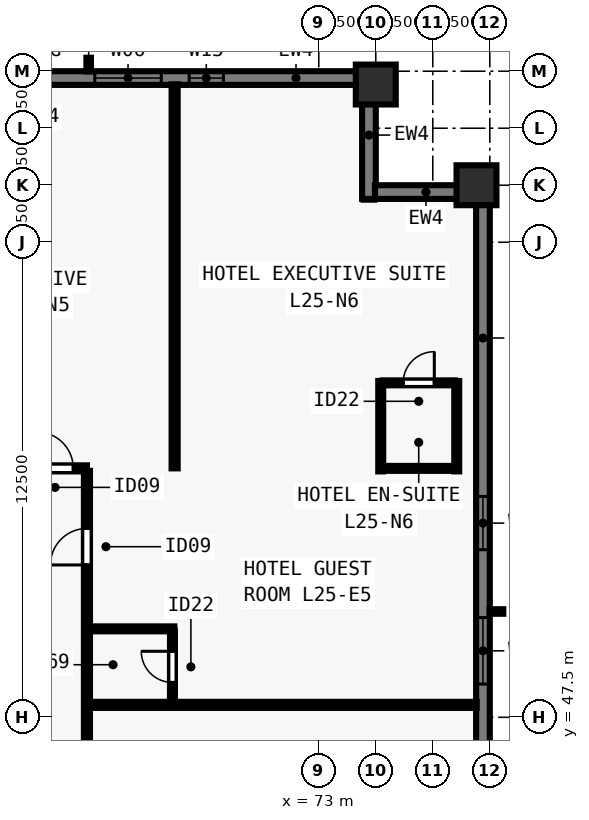
"""IFC4 building model, lengths in metres.
Left out: names, types, materials, properties, quantities, classifications, styles, units other than length and angle.
Written with IfcOpenShell. Run it as: python <this file> out.ifc"""

import sys

from ifc_helpers import new_model, si_unit, direction, frame, frame_2d, origin, origin_2d, place, context, subcontext, project, spatial, rectangle, extrude, element, fill, save


model = new_model("IFC4")
c1 = context("Model", 3, precision=1e-05, world=origin(), true_north=direction((0.0, 1.0)))
c2 = subcontext(c1, "Body", "Model", "MODEL_VIEW")
j1 = project(units=[si_unit("LENGTHUNIT", "METRE"), si_unit("PLANEANGLEUNIT", "RADIAN")], contexts=[c1])
p1 = place(None, origin())
s1 = spatial("IfcSite", under=j1, at=p1, CompositionType="ELEMENT")
p2 = place(p1, origin())
s2 = spatial("IfcBuilding", under=s1, at=p2, CompositionType="ELEMENT")
p3 = place(p2, frame((0.0, 0.0, 93.5)))
s3 = spatial("IfcBuildingStorey", under=s2, at=p3, CompositionType="ELEMENT", Elevation=93.5)
for number, where, z_axis, x_axis in (
    (1, (77.15, 61.5, 0.0), (0.0, 0.0, 1.0), (0.0, 1.0, 0.0)),
    (2, (74.5, 64.15, 0.0), (0.0, 0.0, 1.0), (1.0, 0.0, 0.0)),
):
    element("IfcColumn", number, at=place(p3, frame(where, z_axis=z_axis, x_axis=x_axis)), inside=s3, PredefinedType="COLUMN", context=c2, shape_type="SweptSolid", body=[
        extrude(rectangle(XDim=1.05, YDim=1.05, at=origin_2d()), origin(), (0.0, 0.0, 1.0), 3.5),
    ])
p4 = place(p3, frame((64.4, 64.32, 0.0), z_axis=(0.0, 0.0, 1.0), x_axis=(1.0, 0.0, 0.0)))
e3 = element("IfcWall", 3, at=p4, inside=s3, PredefinedType="SOLIDWALL", context=c2, shape_type="SweptSolid", body=[
    extrude(rectangle(XDim=9.762, YDim=0.36, at=frame_2d((4.881, 0.0))), origin(), (0.0, 0.0, 1.0), 3.24),
])
p5 = place(p4, frame((2.706, 0.0, 0.8)))
e4 = element("IfcOpeningElement", 4, at=p5, cuts=e3, PredefinedType="OPENING", context=c2, shape_type="SweptSolid", body=[
    extrude(rectangle(XDim=1.75, YDim=1.504, at=frame_2d((0.875, 0.752))), frame((0.0, 0.19, 0.0), z_axis=(0.0, -1.0, 0.0), x_axis=(1.0, 0.0, 0.0)), (0.0, 0.0, 1.0), 0.38),
])
p6 = place(p4, frame((5.19, 0.0, 0.8)))
e5 = element("IfcOpeningElement", 5, at=p6, cuts=e3, PredefinedType="OPENING", context=c2, shape_type="SweptSolid", body=[
    extrude(rectangle(XDim=0.9, YDim=1.504, at=frame_2d((0.45, 0.752))), frame((0.0, 0.19, 0.0), z_axis=(0.0, -1.0, 0.0), x_axis=(1.0, 0.0, 0.0)), (0.0, 0.0, 1.0), 0.38),
])
p7 = place(p3, frame((74.32, 64.5, 0.0), z_axis=(0.0, 0.0, 1.0), x_axis=(0.0, -1.0, 0.0)))
e6 = element("IfcWall", 6, at=p7, inside=s3, PredefinedType="SOLIDWALL", context=c2, shape_type="SweptSolid", body=[
    extrude(rectangle(XDim=3.36, YDim=0.36, at=frame_2d((1.68, 0.0))), origin(), (0.0, 0.0, 1.0), 3.24),
])
p8 = place(p3, frame((74.478, 61.32, 0.0), z_axis=(0.0, 0.0, 1.0), x_axis=(1.0, 0.0, 0.0)))
e7 = element("IfcWall", 7, at=p8, inside=s3, PredefinedType="SOLIDWALL", context=c2, shape_type="SweptSolid", body=[
    extrude(rectangle(XDim=2.684, YDim=0.36, at=frame_2d((1.342, 0.0))), origin(), (0.0, 0.0, 1.0), 3.24),
])
p9 = place(p3, frame((77.32, 61.5, 0.0), z_axis=(0.0, 0.0, 1.0), x_axis=(0.0, -1.0, 0.0)))
e8 = element("IfcWall", 8, at=p9, inside=s3, PredefinedType="SOLIDWALL", context=c2, shape_type="SweptSolid", body=[
    extrude(rectangle(XDim=44.662, YDim=0.36, at=frame_2d((22.331, 0.0))), origin(), (0.0, 0.0, 1.0), 3.24),
])
p10 = place(p9, frame((8.19, 0.0, 0.8)))
e9 = element("IfcOpeningElement", 9, at=p10, cuts=e8, PredefinedType="OPENING", context=c2, shape_type="SweptSolid", body=[
    extrude(rectangle(XDim=1.4, YDim=1.504, at=frame_2d((0.7, 0.752))), frame((0.0, 0.19, 0.0), z_axis=(0.0, -1.0, 0.0), x_axis=(1.0, 0.0, 0.0)), (0.0, 0.0, 1.0), 0.38),
])
p11 = place(p9, frame((11.375, 0.0, 0.8)))
e10 = element("IfcOpeningElement", 10, at=p11, cuts=e8, PredefinedType="OPENING", context=c2, shape_type="SweptSolid", body=[
    extrude(rectangle(XDim=1.75, YDim=1.504, at=frame_2d((0.875, 0.752))), frame((0.0, 0.19, 0.0), z_axis=(0.0, -1.0, 0.0), x_axis=(1.0, 0.0, 0.0)), (0.0, 0.0, 1.0), 0.38),
])
p12 = place(p9, frame((14.911, 0.0, 0.8)))
e11 = element("IfcOpeningElement", 11, at=p12, cuts=e8, PredefinedType="OPENING", context=c2, shape_type="SweptSolid", body=[
    extrude(rectangle(XDim=1.4, YDim=1.504, at=frame_2d((0.7, 0.752))), frame((0.0, 0.19, 0.0), z_axis=(0.0, -1.0, 0.0), x_axis=(1.0, 0.0, 0.0)), (0.0, 0.0, 1.0), 0.38),
])
p13 = place(p9, frame((21.631, 0.0, 0.8)))
e12 = element("IfcOpeningElement", 12, at=p13, cuts=e8, PredefinedType="OPENING", context=c2, shape_type="SweptSolid", body=[
    extrude(rectangle(XDim=1.4, YDim=1.504, at=frame_2d((0.7, 0.752))), frame((0.0, 0.19, 0.0), z_axis=(0.0, -1.0, 0.0), x_axis=(1.0, 0.0, 0.0)), (0.0, 0.0, 1.0), 0.38),
])
p14 = place(p9, frame((23.566, 0.0, 0.8)))
e13 = element("IfcOpeningElement", 13, at=p14, cuts=e8, PredefinedType="OPENING", context=c2, shape_type="SweptSolid", body=[
    extrude(rectangle(XDim=1.75, YDim=1.504, at=frame_2d((0.875, 0.752))), frame((0.0, 0.19, 0.0), z_axis=(0.0, -1.0, 0.0), x_axis=(1.0, 0.0, 0.0)), (0.0, 0.0, 1.0), 0.38),
])
p15 = place(p9, frame((28.351, 0.0, 0.8)))
e14 = element("IfcOpeningElement", 14, at=p15, cuts=e8, PredefinedType="OPENING", context=c2, shape_type="SweptSolid", body=[
    extrude(rectangle(XDim=1.4, YDim=1.504, at=frame_2d((0.7, 0.752))), frame((0.0, 0.19, 0.0), z_axis=(0.0, -1.0, 0.0), x_axis=(1.0, 0.0, 0.0)), (0.0, 0.0, 1.0), 0.38),
])
p16 = place(p9, frame((31.987, 0.0, 0.8)))
e15 = element("IfcOpeningElement", 15, at=p16, cuts=e8, PredefinedType="OPENING", context=c2, shape_type="SweptSolid", body=[
    extrude(rectangle(XDim=1.75, YDim=1.504, at=frame_2d((0.875, 0.752))), frame((0.0, 0.19, 0.0), z_axis=(0.0, -1.0, 0.0), x_axis=(1.0, 0.0, 0.0)), (0.0, 0.0, 1.0), 0.38),
])
p17 = place(p9, frame((35.072, 0.0, 0.8)))
e16 = element("IfcOpeningElement", 16, at=p17, cuts=e8, PredefinedType="OPENING", context=c2, shape_type="SweptSolid", body=[
    extrude(rectangle(XDim=1.4, YDim=1.504, at=frame_2d((0.7, 0.752))), frame((0.0, 0.19, 0.0), z_axis=(0.0, -1.0, 0.0), x_axis=(1.0, 0.0, 0.0)), (0.0, 0.0, 1.0), 0.38),
])
p18 = place(p9, frame((38.257, 0.0, 0.8)))
e17 = element("IfcOpeningElement", 17, at=p18, cuts=e8, PredefinedType="OPENING", context=c2, shape_type="SweptSolid", body=[
    extrude(rectangle(XDim=1.75, YDim=1.504, at=frame_2d((0.875, 0.752))), frame((0.0, 0.19, 0.0), z_axis=(0.0, -1.0, 0.0), x_axis=(1.0, 0.0, 0.0)), (0.0, 0.0, 1.0), 0.38),
])
p19 = place(p3, frame((37.1, 54.05, 0.0), z_axis=(0.0, 0.0, 1.0), x_axis=(1.0, 0.0, 0.0)))
e18 = element("IfcWall", 18, at=p19, inside=s3, PredefinedType="PARTITIONING", context=c2, shape_type="SweptSolid", body=[
    extrude(rectangle(XDim=29.8, YDim=0.16, at=frame_2d((14.9, 0.0))), origin(), (0.0, 0.0, 1.0), 3.24),
])
p20 = place(p19, frame((0.91, 0.0, 0.0)))
e19 = element("IfcOpeningElement", 19, at=p20, cuts=e18, PredefinedType="OPENING", context=c2, shape_type="SweptSolid", body=[
    extrude(rectangle(XDim=0.96, YDim=2.15, at=frame_2d((0.48, 1.075))), frame((0.0, 0.09, 0.0), z_axis=(0.0, -1.0, 0.0), x_axis=(1.0, 0.0, 0.0)), (0.0, 0.0, 1.0), 0.18),
])
p21 = place(p19, frame((3.03, 0.0, 0.0)))
e20 = element("IfcOpeningElement", 20, at=p21, cuts=e18, PredefinedType="OPENING", context=c2, shape_type="SweptSolid", body=[
    extrude(rectangle(XDim=0.96, YDim=2.15, at=frame_2d((0.48, 1.075))), frame((0.0, 0.09, 0.0), z_axis=(0.0, -1.0, 0.0), x_axis=(1.0, 0.0, 0.0)), (0.0, 0.0, 1.0), 0.18),
])
p22 = place(p19, frame((11.39, 0.0, 0.0)))
e21 = element("IfcOpeningElement", 21, at=p22, cuts=e18, PredefinedType="OPENING", context=c2, shape_type="SweptSolid", body=[
    extrude(rectangle(XDim=0.96, YDim=2.15, at=frame_2d((0.48, 1.075))), frame((0.0, 0.09, 0.0), z_axis=(0.0, -1.0, 0.0), x_axis=(1.0, 0.0, 0.0)), (0.0, 0.0, 1.0), 0.18),
])
p23 = place(p19, frame((19.75, 0.0, 0.0)))
e22 = element("IfcOpeningElement", 22, at=p23, cuts=e18, PredefinedType="OPENING", context=c2, shape_type="SweptSolid", body=[
    extrude(rectangle(XDim=0.96, YDim=2.15, at=frame_2d((0.48, 1.075))), frame((0.0, 0.09, 0.0), z_axis=(0.0, -1.0, 0.0), x_axis=(1.0, 0.0, 0.0)), (0.0, 0.0, 1.0), 0.18),
])
p24 = place(p19, frame((26.931, 0.0, 0.0)))
e23 = element("IfcOpeningElement", 23, at=p24, cuts=e18, PredefinedType="OPENING", context=c2, shape_type="SweptSolid", body=[
    extrude(rectangle(XDim=0.96, YDim=2.15, at=frame_2d((0.48, 1.075))), frame((0.0, 0.09, 0.0), z_axis=(0.0, -1.0, 0.0), x_axis=(1.0, 0.0, 0.0)), (0.0, 0.0, 1.0), 0.18),
])
p25 = place(p19, frame((28.48, 0.0, 0.0)))
e24 = element("IfcOpeningElement", 24, at=p25, cuts=e18, PredefinedType="OPENING", context=c2, shape_type="SweptSolid", body=[
    extrude(rectangle(XDim=0.96, YDim=2.15, at=frame_2d((0.48, 1.075))), frame((0.0, 0.09, 0.0), z_axis=(0.0, -1.0, 0.0), x_axis=(1.0, 0.0, 0.0)), (0.0, 0.0, 1.0), 0.18),
])
p26 = place(p3, frame((66.9, 24.015, 0.0), z_axis=(0.0, 0.0, 1.0), x_axis=(0.0, 1.0, 0.0)))
e25 = element("IfcWall", 25, at=p26, inside=s3, PredefinedType="PARTITIONING", context=c2, shape_type="SweptSolid", body=[
    extrude(rectangle(XDim=29.97, YDim=0.16, at=frame_2d((14.985, 0.0))), origin(), (0.0, 0.0, 1.0), 3.24),
])
p27 = place(p26, frame((3.911, 0.0, 0.0)))
e26 = element("IfcOpeningElement", 26, at=p27, cuts=e25, PredefinedType="OPENING", context=c2, shape_type="SweptSolid", body=[
    extrude(rectangle(XDim=0.96, YDim=2.15, at=frame_2d((0.48, 1.075))), frame((0.0, 0.09, 0.0), z_axis=(0.0, -1.0, 0.0), x_axis=(1.0, 0.0, 0.0)), (0.0, 0.0, 1.0), 0.18),
])
p28 = place(p26, frame((9.544, 0.0, 0.0)))
e27 = element("IfcOpeningElement", 27, at=p28, cuts=e25, PredefinedType="OPENING", context=c2, shape_type="SweptSolid", body=[
    extrude(rectangle(XDim=0.96, YDim=2.15, at=frame_2d((0.48, 1.075))), frame((0.0, 0.09, 0.0), z_axis=(0.0, -1.0, 0.0), x_axis=(1.0, 0.0, 0.0)), (0.0, 0.0, 1.0), 0.18),
])
p29 = place(p26, frame((15.625, 0.0, 0.0)))
e28 = element("IfcOpeningElement", 28, at=p29, cuts=e25, PredefinedType="OPENING", context=c2, shape_type="SweptSolid", body=[
    extrude(rectangle(XDim=0.96, YDim=2.15, at=frame_2d((0.48, 1.075))), frame((0.0, 0.09, 0.0), z_axis=(0.0, -1.0, 0.0), x_axis=(1.0, 0.0, 0.0)), (0.0, 0.0, 1.0), 0.18),
])
p30 = place(p26, frame((21.584, 0.0, 0.0)))
e29 = element("IfcOpeningElement", 29, at=p30, cuts=e25, PredefinedType="OPENING", context=c2, shape_type="SweptSolid", body=[
    extrude(rectangle(XDim=0.96, YDim=2.15, at=frame_2d((0.48, 1.075))), frame((0.0, 0.09, 0.0), z_axis=(0.0, -1.0, 0.0), x_axis=(1.0, 0.0, 0.0)), (0.0, 0.0, 1.0), 0.18),
])
p31 = place(p26, frame((27.494, 0.0, 0.0)))
e30 = element("IfcOpeningElement", 30, at=p31, cuts=e25, PredefinedType="OPENING", context=c2, shape_type="SweptSolid", body=[
    extrude(rectangle(XDim=0.96, YDim=2.15, at=frame_2d((0.48, 1.075))), frame((0.0, 0.09, 0.0), z_axis=(0.0, -1.0, 0.0), x_axis=(1.0, 0.0, 0.0)), (0.0, 0.0, 1.0), 0.18),
])
p32 = place(p3, frame((69.208, 54.05, 0.0), z_axis=(0.0, 0.0, 1.0), x_axis=(0.0, 1.0, 0.0)))
e31 = element("IfcWall", 31, at=p32, inside=s3, PredefinedType="PARTITIONING", context=c2, shape_type="SweptSolid", body=[
    extrude(rectangle(XDim=10.105, YDim=0.16, at=frame_2d((5.052, 0.0))), origin(), (0.0, 0.0, 1.0), 2.399),
])
for number, where, z_axis, x_axis in (
    (32, (76.63, 53.97, 0.0), (0.0, 0.0, 1.0), (0.0, 1.0, 0.0)),
    (33, (74.63, 53.97, 0.0), (0.0, 0.0, 1.0), (0.0, 1.0, 0.0)),
):
    element("IfcWall", number, at=place(p3, frame(where, z_axis=z_axis, x_axis=x_axis)), inside=s3, PredefinedType="PLUMBINGWALL", context=c2, shape_type="SweptSolid", body=[
        extrude(rectangle(XDim=2.38, YDim=0.13, at=frame_2d((1.19, 0.0))), origin(), (0.0, 0.0, 1.0), 3.24),
    ])
p33 = place(p3, frame((74.68, 56.3, 0.0), z_axis=(0.0, 0.0, 1.0), x_axis=(1.0, 0.0, 0.0)))
e34 = element("IfcWall", 34, at=p33, inside=s3, PredefinedType="PLUMBINGWALL", context=c2, shape_type="SweptSolid", body=[
    extrude(rectangle(XDim=1.9, YDim=0.13, at=frame_2d((0.95, 0.0))), origin(), (0.0, 0.0, 1.0), 3.24),
])
p34 = place(p33, frame((0.54, 0.0, 0.0)))
e35 = element("IfcOpeningElement", 35, at=p34, cuts=e34, PredefinedType="OPENING", context=c2, shape_type="SweptSolid", body=[
    extrude(rectangle(XDim=0.82, YDim=2.1, at=frame_2d((0.41, 1.05))), frame((0.0, 0.075, 0.0), z_axis=(0.0, -1.0, 0.0), x_axis=(1.0, 0.0, 0.0)), (0.0, 0.0, 1.0), 0.15),
])
p35 = place(p3, frame((74.68, 54.05, 0.0), z_axis=(0.0, 0.0, 1.0), x_axis=(1.0, 0.0, 0.0)))
e36 = element("IfcWall", 36, at=p35, inside=s3, PredefinedType="PLUMBINGWALL", context=c2, shape_type="SweptSolid", body=[
    extrude(rectangle(XDim=1.9, YDim=0.13, at=frame_2d((0.95, 0.0))), origin(), (0.0, 0.0, 1.0), 3.24),
])
p36 = place(p3, frame((66.965, 47.827, 0.0), z_axis=(0.0, 0.0, 1.0), x_axis=(1.0, 0.0, 0.0)))
e37 = element("IfcWall", 37, at=p36, inside=s3, PredefinedType="PARTITIONING", context=c2, shape_type="SweptSolid", body=[
    extrude(rectangle(XDim=10.19, YDim=0.16, at=frame_2d((5.095, 0.0))), origin(), (0.0, 0.0, 1.0), 3.24),
])
p37 = place(p3, frame((66.965, 49.827, 0.0), z_axis=(0.0, 0.0, 1.0), x_axis=(1.0, 0.0, 0.0)))
e38 = element("IfcWall", 38, at=p37, inside=s3, PredefinedType="PLUMBINGWALL", context=c2, shape_type="SweptSolid", body=[
    extrude(rectangle(XDim=2.235, YDim=0.13, at=frame_2d((1.117, 0.0))), origin(), (0.0, 0.0, 1.0), 3.24),
])
p38 = place(p3, frame((69.15, 47.893, 0.0), z_axis=(0.0, 0.0, 1.0), x_axis=(0.0, 1.0, 0.0)))
e39 = element("IfcWall", 39, at=p38, inside=s3, PredefinedType="PLUMBINGWALL", context=c2, shape_type="SweptSolid", body=[
    extrude(rectangle(XDim=1.885, YDim=0.13, at=frame_2d((0.942, 0.0))), origin(), (0.0, 0.0, 1.0), 3.24),
])
p39 = place(p38, frame((0.525, 0.0, 0.0)))
e40 = element("IfcOpeningElement", 40, at=p39, cuts=e39, PredefinedType="OPENING", context=c2, shape_type="SweptSolid", body=[
    extrude(rectangle(XDim=0.82, YDim=2.1, at=frame_2d((0.41, 1.05))), frame((0.0, 0.075, 0.0), z_axis=(0.0, -1.0, 0.0), x_axis=(1.0, 0.0, 0.0)), (0.0, 0.0, 1.0), 0.15),
])
p40 = place(p5, origin())
e41 = element("IfcWindow", 41, at=p40, inside=s3, PartitioningType="SINGLE_PANEL", PredefinedType="WINDOW", context=c2, shape_type="SweptSolid", body=[
    extrude(rectangle(XDim=1.75, YDim=1.504, at=frame_2d((0.875, 0.752))), frame((0.0, -0.05, 0.0), z_axis=(0.0, -1.0, 0.0), x_axis=(1.0, 0.0, 0.0)), (0.0, 0.0, 1.0), 0.06),
])
fill(e4, e41)
p41 = place(p10, origin())
e42 = element("IfcWindow", 42, at=p41, inside=s3, PartitioningType="SINGLE_PANEL", PredefinedType="WINDOW", context=c2, shape_type="SweptSolid", body=[
    extrude(rectangle(XDim=1.4, YDim=1.504, at=frame_2d((0.7, 0.752))), frame((0.0, -0.05, 0.0), z_axis=(0.0, -1.0, 0.0), x_axis=(1.0, 0.0, 0.0)), (0.0, 0.0, 1.0), 0.06),
])
fill(e9, e42)
p42 = place(p11, origin())
e43 = element("IfcWindow", 43, at=p42, inside=s3, PartitioningType="SINGLE_PANEL", PredefinedType="WINDOW", context=c2, shape_type="SweptSolid", body=[
    extrude(rectangle(XDim=1.75, YDim=1.504, at=frame_2d((0.875, 0.752))), frame((0.0, -0.05, 0.0), z_axis=(0.0, -1.0, 0.0), x_axis=(1.0, 0.0, 0.0)), (0.0, 0.0, 1.0), 0.06),
])
fill(e10, e43)
p43 = place(p6, origin())
e44 = element("IfcWindow", 44, at=p43, inside=s3, PartitioningType="SINGLE_PANEL", PredefinedType="WINDOW", context=c2, shape_type="SweptSolid", body=[
    extrude(rectangle(XDim=0.9, YDim=1.504, at=frame_2d((0.45, 0.752))), frame((0.0, -0.04, 0.0), z_axis=(0.0, -1.0, 0.0), x_axis=(1.0, 0.0, 0.0)), (0.0, 0.0, 1.0), 0.06),
])
fill(e5, e44)
p44 = place(p34, origin())
e45 = element("IfcDoor", 45, at=p44, inside=s3, OperationType="SINGLE_SWING_RIGHT", PredefinedType="DOOR", context=c2, shape_type="SweptSolid", body=[
    extrude(rectangle(XDim=0.82, YDim=2.1, at=frame_2d((0.41, 1.05))), frame((0.0, 0.025, 0.0), z_axis=(0.0, -1.0, 0.0), x_axis=(1.0, 0.0, 0.0)), (0.0, 0.0, 1.0), 0.05),
])
fill(e35, e45)
p45 = place(p25, origin())
e46 = element("IfcDoor", 46, at=p45, inside=s3, OperationType="SINGLE_SWING_LEFT", PredefinedType="DOOR", context=c2, shape_type="SweptSolid", body=[
    extrude(rectangle(XDim=0.96, YDim=2.15, at=frame_2d((0.48, 1.075))), frame((0.0, 0.025, 0.0), z_axis=(0.0, -1.0, 0.0), x_axis=(1.0, 0.0, 0.0)), (0.0, 0.0, 1.0), 0.05),
])
fill(e24, e46)
p46 = place(p39, origin())
e47 = element("IfcDoor", 47, at=p46, inside=s3, OperationType="SINGLE_SWING_RIGHT", PredefinedType="DOOR", context=c2, shape_type="SweptSolid", body=[
    extrude(rectangle(XDim=0.82, YDim=2.1, at=frame_2d((0.41, 1.05))), frame((0.0, 0.025, 0.0), z_axis=(0.0, -1.0, 0.0), x_axis=(1.0, 0.0, 0.0)), (0.0, 0.0, 1.0), 0.05),
])
fill(e40, e47)
p47 = place(p31, origin())
e48 = element("IfcDoor", 48, at=p47, inside=s3, OperationType="SINGLE_SWING_LEFT", PredefinedType="DOOR", context=c2, shape_type="SweptSolid", body=[
    extrude(rectangle(XDim=0.96, YDim=2.15, at=frame_2d((0.48, 1.075))), frame((0.0, 0.025, 0.0), z_axis=(0.0, -1.0, 0.0), x_axis=(1.0, 0.0, 0.0)), (0.0, 0.0, 1.0), 0.05),
])
fill(e30, e48)
save(model, sys.argv[1])
